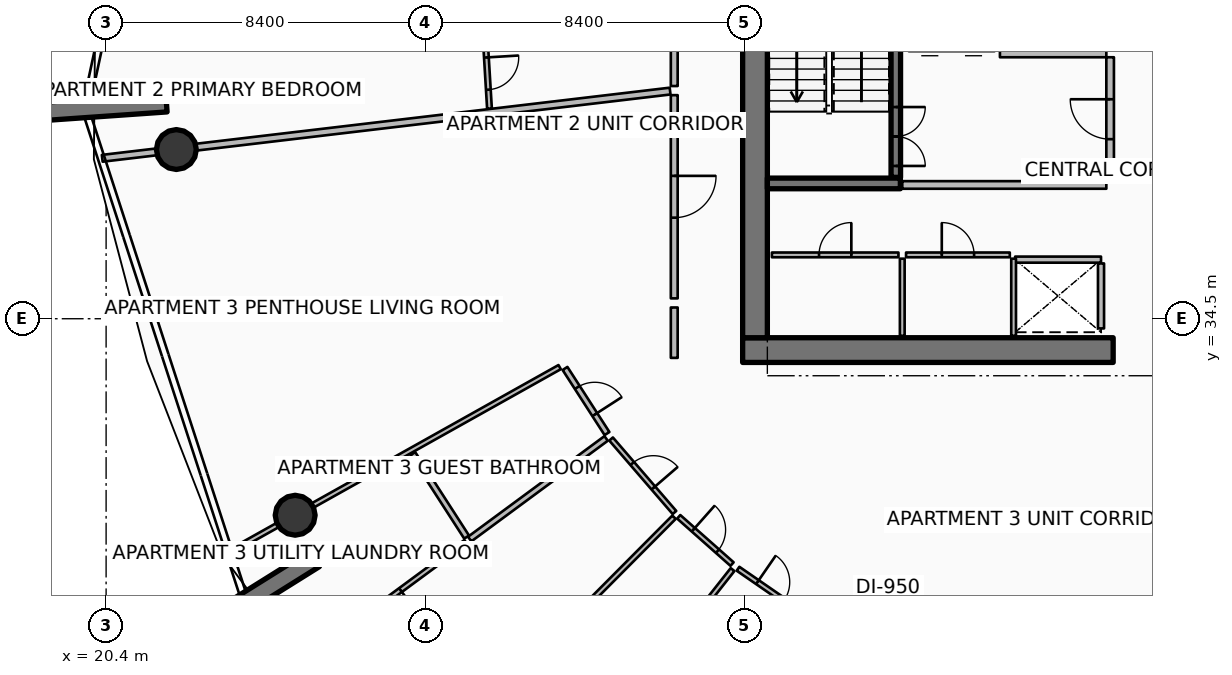
"""IFC4 building model, lengths in metres.
Left out: names, types, materials, properties, quantities, classifications, styles, units other than length and angle.
Written with IfcOpenShell. Run it as: python <this file> out.ifc"""

import sys

from ifc_helpers import new_model, si_unit, direction, frame, frame_2d, origin, origin_2d, place, context, subcontext, project, spatial, rectangle, circle, extrude, element, fill, save


model = new_model("IFC4")
c1 = context("Model", 3, precision=1e-05, world=origin(), true_north=direction((0.0, 1.0)))
c2 = subcontext(c1, "Body", "Model", "MODEL_VIEW")
j1 = project(units=[si_unit("LENGTHUNIT", "METRE"), si_unit("PLANEANGLEUNIT", "RADIAN")], contexts=[c1])
p1 = place(None, origin())
s1 = spatial("IfcSite", under=j1, at=p1, CompositionType="ELEMENT")
p2 = place(p1, origin())
s2 = spatial("IfcBuilding", under=s1, at=p2, CompositionType="ELEMENT")
p3 = place(p2, frame((0.0, 0.0, 210.3)))
s3 = spatial("IfcBuildingStorey", under=s2, at=p3, CompositionType="ELEMENT", Elevation=210.3)
p4 = place(p3, frame((37.15, 33.675, 0.0), z_axis=(0.0, 0.0, 1.0), x_axis=(1.0, 0.0, 0.0)))
e1 = element("IfcWall", 1, at=p4, inside=s3, PredefinedType="SHEAR", context=c2, shape_type="SweptSolid", body=[
    extrude(rectangle(XDim=9.75, YDim=0.65, at=frame_2d((4.875, 0.0))), origin(), (0.0, 0.0, 1.0), 3.75),
])
p5 = place(p3, frame((37.475, 34.0, 0.0), z_axis=(0.0, 0.0, 1.0), x_axis=(0.0, 1.0, 0.0)))
e2 = element("IfcWall", 2, at=p5, inside=s3, PredefinedType="SHEAR", context=c2, shape_type="SweptSolid", body=[
    extrude(rectangle(XDim=16.0, YDim=0.65, at=frame_2d((8.0, 0.0))), origin(), (0.0, 0.0, 1.0), 3.75),
])
p6 = place(p3, frame((37.8, 38.06, 0.0), z_axis=(0.0, 0.0, 1.0), x_axis=(1.0, 0.0, 0.0)))
e3 = element("IfcWall", 3, at=p6, inside=s3, PredefinedType="SHEAR", context=c2, shape_type="SweptSolid", body=[
    extrude(rectangle(XDim=3.5, YDim=0.28, at=frame_2d((1.75, 0.0))), origin(), (0.0, 0.0, 1.0), 3.75),
])
p7 = place(p3, frame((21.987, 40.181, 0.0), z_axis=(0.0, 0.0, 1.0), x_axis=(-0.997568676264, -0.069690287244, 0.0)))
e4 = element("IfcWall", 4, at=p7, inside=s3, PredefinedType="SOLIDWALL", context=c2, shape_type="SweptSolid", body=[
    extrude(rectangle(XDim=3.5, YDim=0.48, at=frame_2d((1.75, 0.0))), origin(), (0.0, 0.0, 1.0), 3.75),
])
p8 = place(p3, frame((25.886, 28.182, 0.0), z_axis=(0.0, 0.0, 1.0), x_axis=(-0.848033572426, -0.529942506352, 0.0)))
e5 = element("IfcWall", 5, at=p8, inside=s3, PredefinedType="SOLIDWALL", context=c2, shape_type="SweptSolid", body=[
    extrude(rectangle(XDim=3.5, YDim=0.48, at=frame_2d((1.75, 0.0))), origin(), (0.0, 0.0, 1.0), 3.75),
])
for number, where, z_axis, x_axis in (
    (6, (22.248, 38.952, 0.0), (0.0, 0.0, 1.0), (1.0, 0.0, 0.0)),
    (7, (25.375, 29.329, 0.0), (0.0, 0.0, 1.0), (1.0, 0.0, 0.0)),
):
    element("IfcColumn", number, at=place(p3, frame(where, z_axis=z_axis, x_axis=x_axis)), inside=s3, PredefinedType="COLUMN", context=c2, shape_type="SweptSolid", body=[
        extrude(circle(Radius=0.525, at=origin_2d()), origin(), (0.0, 0.0, 1.0), 3.5),
    ])
p9 = place(p3, frame((41.18, 38.22, 0.0), z_axis=(0.0, 0.0, 1.0), x_axis=(0.0, 1.0, 0.0)))
e8 = element("IfcWall", 8, at=p9, inside=s3, PredefinedType="SOLIDWALL", context=c2, shape_type="SweptSolid", body=[
    extrude(rectangle(XDim=7.56, YDim=0.25, at=frame_2d((3.78, 0.0))), origin(), (0.0, 0.0, 1.0), 3.5),
])
p10 = place(p9, frame((0.3, 0.0, 0.0)))
e9 = element("IfcOpeningElement", 9, at=p10, cuts=e8, PredefinedType="OPENING", context=c2, shape_type="SweptSolid", body=[
    extrude(rectangle(XDim=1.55, YDim=2.15, at=frame_2d((0.775, 1.075))), frame((0.0, 0.135, 0.0), z_axis=(0.0, -1.0, 0.0), x_axis=(1.0, 0.0, 0.0)), (0.0, 0.0, 1.0), 0.27),
])
p11 = place(p3, frame((44.32, 36.055, 0.0), z_axis=(0.0, 0.0, 1.0), x_axis=(1.0, 0.0, 0.0)))
e10 = element("IfcWall", 10, at=p11, inside=s3, PredefinedType="PARTITIONING", context=c2, shape_type="SweptSolid", body=[
    extrude(rectangle(XDim=2.26, YDim=0.16, at=frame_2d((1.13, 0.0))), origin(), (0.0, 0.0, 1.0), 3.5),
])
p12 = place(p3, frame((46.58, 34.245, 0.0), z_axis=(0.0, 0.0, 1.0), x_axis=(0.0, 1.0, 0.0)))
e11 = element("IfcWall", 11, at=p12, inside=s3, PredefinedType="PARTITIONING", context=c2, shape_type="SweptSolid", body=[
    extrude(rectangle(XDim=1.71, YDim=0.16, at=frame_2d((0.855, 0.0))), origin(), (0.0, 0.0, 1.0), 3.5),
])
for number, where, z_axis, x_axis in (
    (12, (44.28, 34.05, 0.0), (0.0, 0.0, 1.0), (0.0, 1.0, 0.0)),
    (13, (41.35, 34.05, 0.0), (0.0, 0.0, 1.0), (0.0, 1.0, 0.0)),
):
    element("IfcWall", number, at=place(p3, frame(where, z_axis=z_axis, x_axis=x_axis)), inside=s3, PredefinedType="PARTITIONING", context=c2, shape_type="SweptSolid", body=[
        extrude(rectangle(XDim=2.03, YDim=0.125, at=frame_2d((1.015, 0.0))), origin(), (0.0, 0.0, 1.0), 2.94),
    ])
p13 = place(p3, frame((37.92, 36.18, 0.0), z_axis=(0.0, 0.0, 1.0), x_axis=(1.0, 0.0, 0.0)))
e14 = element("IfcWall", 14, at=p13, inside=s3, PredefinedType="PARTITIONING", context=c2, shape_type="SweptSolid", body=[
    extrude(rectangle(XDim=3.33, YDim=0.125, at=frame_2d((1.665, 0.0))), origin(), (0.0, 0.0, 1.0), 2.94),
])
p14 = place(p13, frame((1.24, 0.0, 0.0)))
e15 = element("IfcOpeningElement", 15, at=p14, cuts=e14, PredefinedType="OPENING", context=c2, shape_type="SweptSolid", body=[
    extrude(rectangle(XDim=0.85, YDim=2.06, at=frame_2d((0.425, 1.03))), frame((0.0, 0.073, 0.0), z_axis=(0.0, -1.0, 0.0), x_axis=(1.0, 0.0, 0.0)), (0.0, 0.0, 1.0), 0.145),
])
p15 = place(p3, frame((41.45, 36.18, 0.0), z_axis=(0.0, 0.0, 1.0), x_axis=(1.0, 0.0, 0.0)))
e16 = element("IfcWall", 16, at=p15, inside=s3, PredefinedType="PARTITIONING", context=c2, shape_type="SweptSolid", body=[
    extrude(rectangle(XDim=2.73, YDim=0.125, at=frame_2d((1.365, 0.0))), origin(), (0.0, 0.0, 1.0), 2.94),
])
p16 = place(p15, frame((0.94, 0.0, 0.0)))
e17 = element("IfcOpeningElement", 17, at=p16, cuts=e16, PredefinedType="OPENING", context=c2, shape_type="SweptSolid", body=[
    extrude(rectangle(XDim=0.85, YDim=2.06, at=frame_2d((0.425, 1.03))), frame((0.0, 0.073, 0.0), z_axis=(0.0, -1.0, 0.0), x_axis=(1.0, 0.0, 0.0)), (0.0, 0.0, 1.0), 0.145),
])
p17 = place(p3, frame((41.35, 38.02, 0.0), z_axis=(0.0, 0.0, 1.0), x_axis=(1.0, 0.0, 0.0)))
e18 = element("IfcWall", 18, at=p17, inside=s3, PredefinedType="PARTITIONING", context=c2, shape_type="SweptSolid", body=[
    extrude(rectangle(XDim=5.37, YDim=0.2, at=frame_2d((2.685, 0.0))), origin(), (0.0, 0.0, 1.0), 3.5),
])
p18 = place(p3, frame((43.92, 41.48, 0.0), z_axis=(0.0, 0.0, 1.0), x_axis=(1.0, 0.0, 0.0)))
e19 = element("IfcWall", 19, at=p18, inside=s3, PredefinedType="PARTITIONING", context=c2, shape_type="SweptSolid", body=[
    extrude(rectangle(XDim=2.8, YDim=0.2, at=frame_2d((1.4, 0.0))), origin(), (0.0, 0.0, 1.0), 3.5),
])
p19 = place(p3, frame((46.82, 38.12, 0.0), z_axis=(0.0, 0.0, 1.0), x_axis=(0.0, 1.0, 0.0)))
e20 = element("IfcWall", 20, at=p19, inside=s3, PredefinedType="PARTITIONING", context=c2, shape_type="SweptSolid", body=[
    extrude(rectangle(XDim=3.26, YDim=0.2, at=frame_2d((1.63, 0.0))), origin(), (0.0, 0.0, 1.0), 3.5),
])
p20 = place(p19, frame((1.105, 0.0, 0.0)))
e21 = element("IfcOpeningElement", 21, at=p20, cuts=e20, PredefinedType="OPENING", context=c2, shape_type="SweptSolid", body=[
    extrude(rectangle(XDim=1.05, YDim=2.1, at=frame_2d((0.525, 1.05))), frame((0.0, 0.11, 0.0), z_axis=(0.0, -1.0, 0.0), x_axis=(1.0, 0.0, 0.0)), (0.0, 0.0, 1.0), 0.22),
])
p21 = place(p3, frame((35.241, 40.49, 0.0), z_axis=(0.0, 0.0, 1.0), x_axis=(-0.993066731786, -0.117551972417, 0.0)))
e22 = element("IfcWall", 22, at=p21, inside=s3, PredefinedType="PARTITIONING", context=c2, shape_type="SweptSolid", body=[
    extrude(rectangle(XDim=15.047, YDim=0.18, at=frame_2d((7.523, 0.0))), origin(), (0.0, 0.0, 1.0), 2.94),
])
p22 = place(p3, frame((35.35, 45.448, 0.0), z_axis=(0.0, 0.0, 1.0), x_axis=(0.0, -1.0, 0.0)))
e23 = element("IfcWall", 23, at=p22, inside=s3, PredefinedType="PARTITIONING", context=c2, shape_type="SweptSolid", body=[
    extrude(rectangle(XDim=4.825, YDim=0.18, at=frame_2d((2.413, 0.0))), origin(), (0.0, 0.0, 1.0), 2.94),
])
p23 = place(p3, frame((30.377, 41.873, 0.0), z_axis=(0.0, 0.0, 1.0), x_axis=(0.060215971637, -0.998185371942, 0.0)))
e24 = element("IfcWall", 24, at=p23, inside=s3, PredefinedType="PARTITIONING", context=c2, shape_type="SweptSolid", body=[
    extrude(rectangle(XDim=1.849, YDim=0.125, at=frame_2d((0.924, 0.0))), origin(), (0.0, 0.0, 1.0), 2.94),
])
p24 = place(p23, frame((0.5, 0.0, 0.0)))
e25 = element("IfcOpeningElement", 25, at=p24, cuts=e24, PredefinedType="OPENING", context=c2, shape_type="SweptSolid", body=[
    extrude(rectangle(XDim=0.85, YDim=2.06, at=frame_2d((0.425, 1.03))), frame((0.0, 0.073, 0.0), z_axis=(0.0, -1.0, 0.0), x_axis=(1.0, 0.0, 0.0)), (0.0, 0.0, 1.0), 0.145),
])
p25 = place(p3, frame((35.35, 40.383, 0.0), z_axis=(0.0, 0.0, 1.0), x_axis=(0.0, -1.0, 0.0)))
e26 = element("IfcWall", 26, at=p25, inside=s3, PredefinedType="PARTITIONING", context=c2, shape_type="SweptSolid", body=[
    extrude(rectangle(XDim=5.347, YDim=0.18, at=frame_2d((2.674, 0.0))), origin(), (0.0, 0.0, 1.0), 2.94),
])
p26 = place(p25, frame((2.124, 0.0, 0.0)))
e27 = element("IfcOpeningElement", 27, at=p26, cuts=e26, PredefinedType="OPENING", context=c2, shape_type="SweptSolid", body=[
    extrude(rectangle(XDim=1.1, YDim=2.1, at=frame_2d((0.55, 1.05))), frame((0.0, 0.1, 0.0), z_axis=(0.0, -1.0, 0.0), x_axis=(1.0, 0.0, 0.0)), (0.0, 0.0, 1.0), 0.2),
])
p27 = place(p3, frame((35.35, 34.796, 0.0), z_axis=(0.0, 0.0, 1.0), x_axis=(0.0, -1.0, 0.0)))
e28 = element("IfcWall", 28, at=p27, inside=s3, PredefinedType="PARTITIONING", context=c2, shape_type="SweptSolid", body=[
    extrude(rectangle(XDim=1.326, YDim=0.18, at=frame_2d((0.663, 0.0))), origin(), (0.0, 0.0, 1.0), 2.94),
])
p28 = place(p3, frame((32.334, 33.227, 0.0), z_axis=(0.0, 0.0, 1.0), x_axis=(-0.872500152392, -0.488613839424, 0.0)))
e29 = element("IfcWall", 29, at=p28, inside=s3, PredefinedType="PARTITIONING", context=c2, shape_type="SweptSolid", body=[
    extrude(rectangle(XDim=9.94, YDim=0.125, at=frame_2d((4.97, 0.0))), origin(), (0.0, 0.0, 1.0), 2.94),
])
p29 = place(p3, frame((32.476, 33.192, 0.0), z_axis=(0.0, 0.0, 1.0), x_axis=(0.542143239932, -0.840286086637, 0.0)))
e30 = element("IfcWall", 30, at=p29, inside=s3, PredefinedType="PARTITIONING", context=c2, shape_type="SweptSolid", body=[
    extrude(rectangle(XDim=2.038, YDim=0.15, at=frame_2d((1.019, 0.0))), origin(), (0.0, 0.0, 1.0), 2.94),
])
p30 = place(p29, frame((0.594, 0.0, 0.0)))
e31 = element("IfcOpeningElement", 31, at=p30, cuts=e30, PredefinedType="OPENING", context=c2, shape_type="SweptSolid", body=[
    extrude(rectangle(XDim=0.85, YDim=2.06, at=frame_2d((0.425, 1.03))), frame((0.0, 0.085, 0.0), z_axis=(0.0, -1.0, 0.0), x_axis=(1.0, 0.0, 0.0)), (0.0, 0.0, 1.0), 0.17),
])
p31 = place(p3, frame((28.471, 30.949, 0.0), z_axis=(0.0, 0.0, 1.0), x_axis=(0.542080018781, -0.840326872853, 0.0)))
e32 = element("IfcWall", 32, at=p31, inside=s3, PredefinedType="PARTITIONING", context=c2, shape_type="SweptSolid", body=[
    extrude(rectangle(XDim=2.611, YDim=0.15, at=frame_2d((1.306, 0.0))), origin(), (0.0, 0.0, 1.0), 2.94),
])
p32 = place(p3, frame((33.557, 31.35, 0.0), z_axis=(0.0, 0.0, 1.0), x_axis=(-0.804841149106, -0.593490290322, 0.0)))
e33 = element("IfcWall", 33, at=p32, inside=s3, PredefinedType="PARTITIONING", context=c2, shape_type="SweptSolid", body=[
    extrude(rectangle(XDim=4.46, YDim=0.15, at=frame_2d((2.23, 0.0))), origin(), (0.0, 0.0, 1.0), 2.94),
])
p33 = place(p3, frame((29.863, 28.626, 0.0), z_axis=(0.0, 0.0, 1.0), x_axis=(-0.804842237675, -0.593488814094, 0.0)))
e34 = element("IfcWall", 34, at=p33, inside=s3, PredefinedType="PARTITIONING", context=c2, shape_type="SweptSolid", body=[
    extrude(rectangle(XDim=5.115, YDim=0.125, at=frame_2d((2.558, 0.0))), origin(), (0.0, 0.0, 1.0), 2.94),
])
p34 = place(p33, frame((2.133, 0.0, 0.0)))
e35 = element("IfcOpeningElement", 35, at=p34, cuts=e34, PredefinedType="OPENING", context=c2, shape_type="SweptSolid", body=[
    extrude(rectangle(XDim=0.85, YDim=2.06, at=frame_2d((0.425, 1.03))), frame((0.0, 0.073, 0.0), z_axis=(0.0, -1.0, 0.0), x_axis=(1.0, 0.0, 0.0)), (0.0, 0.0, 1.0), 0.145),
])
p35 = place(p3, frame((35.344, 29.277, 0.0), z_axis=(0.0, 0.0, 1.0), x_axis=(-0.705226489462, -0.708982086206, 0.0)))
e36 = element("IfcWall", 36, at=p35, inside=s3, PredefinedType="PARTITIONING", context=c2, shape_type="SweptSolid", body=[
    extrude(rectangle(XDim=9.166, YDim=0.125, at=frame_2d((4.583, 0.0))), origin(), (0.0, 0.0, 1.0), 2.94),
])
p36 = place(p3, frame((33.688, 31.335, 0.0), z_axis=(0.0, 0.0, 1.0), x_axis=(0.653119308398, -0.757255022431, 0.0)))
e37 = element("IfcWall", 37, at=p36, inside=s3, PredefinedType="PARTITIONING", context=c2, shape_type="SweptSolid", body=[
    extrude(rectangle(XDim=2.553, YDim=0.125, at=frame_2d((1.277, 0.0))), origin(), (0.0, 0.0, 1.0), 2.94),
])
p37 = place(p36, frame((0.852, 0.0, 0.0)))
e38 = element("IfcOpeningElement", 38, at=p37, cuts=e37, PredefinedType="OPENING", context=c2, shape_type="SweptSolid", body=[
    extrude(rectangle(XDim=0.85, YDim=2.06, at=frame_2d((0.425, 1.03))), frame((0.0, 0.073, 0.0), z_axis=(0.0, -1.0, 0.0), x_axis=(1.0, 0.0, 0.0)), (0.0, 0.0, 1.0), 0.145),
])
p38 = place(p3, frame((35.468, 29.288, 0.0), z_axis=(0.0, 0.0, 1.0), x_axis=(0.748399816021, -0.663247853656, 0.0)))
e39 = element("IfcWall", 39, at=p38, inside=s3, PredefinedType="PARTITIONING", context=c2, shape_type="SweptSolid", body=[
    extrude(rectangle(XDim=1.875, YDim=0.125, at=frame_2d((0.938, 0.0))), origin(), (0.0, 0.0, 1.0), 2.94),
])
p39 = place(p38, frame((0.512, 0.0, 0.0)))
e40 = element("IfcOpeningElement", 40, at=p39, cuts=e39, PredefinedType="OPENING", context=c2, shape_type="SweptSolid", body=[
    extrude(rectangle(XDim=0.85, YDim=2.06, at=frame_2d((0.425, 1.03))), frame((0.0, 0.073, 0.0), z_axis=(0.0, -1.0, 0.0), x_axis=(1.0, 0.0, 0.0)), (0.0, 0.0, 1.0), 0.145),
])
p40 = place(p3, frame((36.884, 27.9, 0.0), z_axis=(0.0, 0.0, 1.0), x_axis=(-0.619094580594, -0.785316433216, 0.0)))
e41 = element("IfcWall", 41, at=p40, inside=s3, PredefinedType="PARTITIONING", context=c2, shape_type="SweptSolid", body=[
    extrude(rectangle(XDim=9.175, YDim=0.125, at=frame_2d((4.588, 0.0))), origin(), (0.0, 0.0, 1.0), 2.94),
])
p41 = place(p3, frame((37.028, 27.921, 0.0), z_axis=(0.0, 0.0, 1.0), x_axis=(0.823103592367, -0.567891253879, 0.0)))
e42 = element("IfcWall", 42, at=p41, inside=s3, PredefinedType="PARTITIONING", context=c2, shape_type="SweptSolid", body=[
    extrude(rectangle(XDim=2.09, YDim=0.125, at=frame_2d((1.045, 0.0))), origin(), (0.0, 0.0, 1.0), 2.94),
])
p42 = place(p41, frame((0.62, 0.0, 0.0)))
e43 = element("IfcOpeningElement", 43, at=p42, cuts=e42, PredefinedType="OPENING", context=c2, shape_type="SweptSolid", body=[
    extrude(rectangle(XDim=0.85, YDim=2.06, at=frame_2d((0.425, 1.03))), frame((0.0, 0.073, 0.0), z_axis=(0.0, -1.0, 0.0), x_axis=(1.0, 0.0, 0.0)), (0.0, 0.0, 1.0), 0.145),
])
p43 = place(p10, origin())
e44 = element("IfcDoor", 44, at=p43, inside=s3, OperationType="DOUBLE_DOOR_SINGLE_SWING", PredefinedType="DOOR", context=c2, shape_type="SweptSolid", body=[
    extrude(rectangle(XDim=1.55, YDim=2.15, at=frame_2d((0.775, 1.075))), frame((0.0, 0.025, 0.0), z_axis=(0.0, -1.0, 0.0), x_axis=(1.0, 0.0, 0.0)), (0.0, 0.0, 1.0), 0.05),
])
fill(e9, e44)
p44 = place(p14, origin())
e45 = element("IfcDoor", 45, at=p44, inside=s3, OperationType="SINGLE_SWING_RIGHT", PredefinedType="DOOR", context=c2, shape_type="SweptSolid", body=[
    extrude(rectangle(XDim=0.85, YDim=2.06, at=frame_2d((0.425, 1.03))), frame((0.0, 0.025, 0.0), z_axis=(0.0, -1.0, 0.0), x_axis=(1.0, 0.0, 0.0)), (0.0, 0.0, 1.0), 0.05),
])
fill(e15, e45)
p45 = place(p16, origin())
e46 = element("IfcDoor", 46, at=p45, inside=s3, OperationType="SINGLE_SWING_LEFT", PredefinedType="DOOR", context=c2, shape_type="SweptSolid", body=[
    extrude(rectangle(XDim=0.85, YDim=2.06, at=frame_2d((0.425, 1.03))), frame((0.0, 0.025, 0.0), z_axis=(0.0, -1.0, 0.0), x_axis=(1.0, 0.0, 0.0)), (0.0, 0.0, 1.0), 0.05),
])
fill(e17, e46)
p46 = place(p20, origin())
e47 = element("IfcDoor", 47, at=p46, inside=s3, OperationType="SINGLE_SWING_RIGHT", PredefinedType="DOOR", context=c2, shape_type="SweptSolid", body=[
    extrude(rectangle(XDim=1.05, YDim=2.1, at=frame_2d((0.525, 1.05))), frame((0.0, 0.025, 0.0), z_axis=(0.0, -1.0, 0.0), x_axis=(1.0, 0.0, 0.0)), (0.0, 0.0, 1.0), 0.05),
])
fill(e21, e47)
p47 = place(p24, origin())
e48 = element("IfcDoor", 48, at=p47, inside=s3, OperationType="SINGLE_SWING_LEFT", PredefinedType="DOOR", context=c2, shape_type="SweptSolid", body=[
    extrude(rectangle(XDim=0.85, YDim=2.06, at=frame_2d((0.425, 1.03))), frame((0.0, 0.025, 0.0), z_axis=(0.0, -1.0, 0.0), x_axis=(1.0, 0.0, 0.0)), (0.0, 0.0, 1.0), 0.05),
])
fill(e25, e48)
p48 = place(p26, origin())
e49 = element("IfcDoor", 49, at=p48, inside=s3, OperationType="SINGLE_SWING_LEFT", PredefinedType="DOOR", context=c2, shape_type="SweptSolid", body=[
    extrude(rectangle(XDim=1.1, YDim=2.1, at=frame_2d((0.55, 1.05))), frame((0.0, 0.025, 0.0), z_axis=(0.0, -1.0, 0.0), x_axis=(1.0, 0.0, 0.0)), (0.0, 0.0, 1.0), 0.05),
])
fill(e27, e49)
p49 = place(p30, origin())
e50 = element("IfcDoor", 50, at=p49, inside=s3, OperationType="SINGLE_SWING_RIGHT", PredefinedType="DOOR", context=c2, shape_type="SweptSolid", body=[
    extrude(rectangle(XDim=0.85, YDim=2.06, at=frame_2d((0.425, 1.03))), frame((0.0, 0.025, 0.0), z_axis=(0.0, -1.0, 0.0), x_axis=(1.0, 0.0, 0.0)), (0.0, 0.0, 1.0), 0.05),
])
fill(e31, e50)
p50 = place(p34, origin())
e51 = element("IfcDoor", 51, at=p50, inside=s3, OperationType="SINGLE_SWING_LEFT", PredefinedType="DOOR", context=c2, shape_type="SweptSolid", body=[
    extrude(rectangle(XDim=0.85, YDim=2.06, at=frame_2d((0.425, 1.03))), frame((0.0, 0.025, 0.0), z_axis=(0.0, -1.0, 0.0), x_axis=(1.0, 0.0, 0.0)), (0.0, 0.0, 1.0), 0.05),
])
fill(e35, e51)
p51 = place(p37, origin())
e52 = element("IfcDoor", 52, at=p51, inside=s3, OperationType="SINGLE_SWING_RIGHT", PredefinedType="DOOR", context=c2, shape_type="SweptSolid", body=[
    extrude(rectangle(XDim=0.85, YDim=2.06, at=frame_2d((0.425, 1.03))), frame((0.0, 0.025, 0.0), z_axis=(0.0, -1.0, 0.0), x_axis=(1.0, 0.0, 0.0)), (0.0, 0.0, 1.0), 0.05),
])
fill(e38, e52)
p52 = place(p39, origin())
e53 = element("IfcDoor", 53, at=p52, inside=s3, OperationType="SINGLE_SWING_LEFT", PredefinedType="DOOR", context=c2, shape_type="SweptSolid", body=[
    extrude(rectangle(XDim=0.85, YDim=2.06, at=frame_2d((0.425, 1.03))), frame((0.0, 0.025, 0.0), z_axis=(0.0, -1.0, 0.0), x_axis=(1.0, 0.0, 0.0)), (0.0, 0.0, 1.0), 0.05),
])
fill(e40, e53)
p53 = place(p42, origin())
e54 = element("IfcDoor", 54, at=p53, inside=s3, OperationType="SINGLE_SWING_LEFT", PredefinedType="DOOR", context=c2, shape_type="SweptSolid", body=[
    extrude(rectangle(XDim=0.85, YDim=2.06, at=frame_2d((0.425, 1.03))), frame((0.0, 0.025, 0.0), z_axis=(0.0, -1.0, 0.0), x_axis=(1.0, 0.0, 0.0)), (0.0, 0.0, 1.0), 0.05),
])
fill(e43, e54)
save(model, sys.argv[1])
